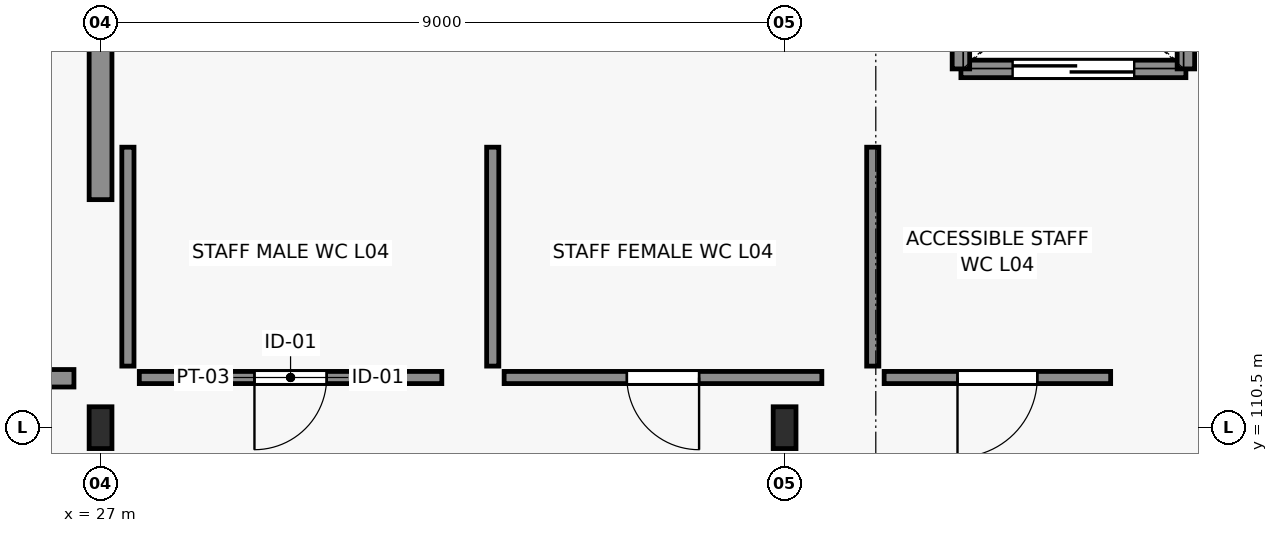
"""IFC4 building model, lengths in metres.
Left out: names, types, materials, properties, quantities, classifications, styles, units other than length and angle.
Written with IfcOpenShell. Run it as: python <this file> out.ifc"""

import sys

from ifc_helpers import new_model, si_unit, direction, frame, frame_2d, origin, origin_2d, place, context, subcontext, project, spatial, rectangle, i_section, extrude, element, fill, save


model = new_model("IFC4")
c1 = context("Model", 3, precision=1e-05, world=origin(), true_north=direction((0.0, 1.0)))
c2 = subcontext(c1, "Body", "Model", "MODEL_VIEW")
j1 = project(units=[si_unit("LENGTHUNIT", "METRE"), si_unit("PLANEANGLEUNIT", "RADIAN")], contexts=[c1])
p1 = place(None, origin())
s1 = spatial("IfcSite", under=j1, at=p1, CompositionType="ELEMENT")
p2 = place(p1, origin())
s2 = spatial("IfcBuilding", under=s1, at=p2, CompositionType="ELEMENT")
p3 = place(p2, frame((0.0, 0.0, 19.5)))
s3 = spatial("IfcBuildingStorey", under=s2, at=p3, CompositionType="ELEMENT", Elevation=19.5)
for number, where, z_axis, x_axis in (
    (1, (27.0, 110.5, 0.0), (0.0, 0.0, 1.0), (1.0, 0.0, 0.0)),
    (2, (36.0, 110.5, 0.0), (0.0, 0.0, 1.0), (1.0, 0.0, 0.0)),
):
    element("IfcColumn", number, at=place(p3, frame(where, z_axis=z_axis, x_axis=x_axis)), inside=s3, PredefinedType="COLUMN", context=c2, shape_type="SweptSolid", body=[
        extrude(i_section(OverallWidth=0.3, OverallDepth=0.55, WebThickness=0.015, FlangeThickness=0.029, FilletRadius=0.027, at=origin_2d()), origin(), (0.0, 0.0, 1.0), 4.275),
    ])
p4 = place(p3, frame((27.0, 113.5, 0.0), z_axis=(0.0, 0.0, 1.0), x_axis=(0.0, 1.0, 0.0)))
e3 = element("IfcWall", 3, at=p4, inside=s3, PredefinedType="SHEAR", context=c2, shape_type="SweptSolid", body=[
    extrude(rectangle(XDim=4.825, YDim=0.3, at=frame_2d((2.413, 0.0))), origin(), (0.0, 0.0, 1.0), 4.275),
])
p5 = place(p3, frame((31.49, 111.16, 0.0), z_axis=(0.0, 0.0, 1.0), x_axis=(-1.0, 0.0, 0.0)))
e4 = element("IfcWall", 4, at=p5, inside=s3, PredefinedType="PARTITIONING", context=c2, shape_type="SweptSolid", body=[
    extrude(rectangle(XDim=3.98, YDim=0.16, at=frame_2d((1.99, 0.0))), origin(), (0.0, 0.0, 1.0), 4.025),
])
p6 = place(p5, frame((1.515, 0.0, 0.0)))
e5 = element("IfcOpeningElement", 5, at=p6, cuts=e4, PredefinedType="OPENING", context=c2, shape_type="SweptSolid", body=[
    extrude(rectangle(XDim=0.95, YDim=2.15, at=frame_2d((0.475, 1.075))), frame((0.0, 0.09, 0.0), z_axis=(0.0, -1.0, 0.0), x_axis=(1.0, 0.0, 0.0)), (0.0, 0.0, 1.0), 0.18),
])
p7 = place(p3, frame((27.36, 111.31, 0.0), z_axis=(0.0, 0.0, 1.0), x_axis=(0.0, 1.0, 0.0)))
e6 = element("IfcWall", 6, at=p7, inside=s3, PredefinedType="PARTITIONING", context=c2, shape_type="SweptSolid", body=[
    extrude(rectangle(XDim=2.88, YDim=0.16, at=frame_2d((1.44, 0.0))), origin(), (0.0, 0.0, 1.0), 4.25),
])
p8 = place(p3, frame((36.49, 111.16, 0.0), z_axis=(0.0, 0.0, 1.0), x_axis=(-1.0, 0.0, 0.0)))
e7 = element("IfcWall", 7, at=p8, inside=s3, PredefinedType="PARTITIONING", context=c2, shape_type="SweptSolid", body=[
    extrude(rectangle(XDim=4.18, YDim=0.16, at=frame_2d((2.09, 0.0))), origin(), (0.0, 0.0, 1.0), 3.695),
])
p9 = place(p8, frame((1.615, 0.0, 0.0)))
e8 = element("IfcOpeningElement", 8, at=p9, cuts=e7, PredefinedType="OPENING", context=c2, shape_type="SweptSolid", body=[
    extrude(rectangle(XDim=0.95, YDim=2.15, at=frame_2d((0.475, 1.075))), frame((0.0, 0.09, 0.0), z_axis=(0.0, -1.0, 0.0), x_axis=(1.0, 0.0, 0.0)), (0.0, 0.0, 1.0), 0.18),
])
p10 = place(p3, frame((32.16, 111.31, 0.0), z_axis=(0.0, 0.0, 1.0), x_axis=(0.0, 1.0, 0.0)))
e9 = element("IfcWall", 9, at=p10, inside=s3, PredefinedType="PARTITIONING", context=c2, shape_type="SweptSolid", body=[
    extrude(rectangle(XDim=2.88, YDim=0.16, at=frame_2d((1.44, 0.0))), origin(), (0.0, 0.0, 1.0), 4.25),
])
p11 = place(p3, frame((40.29, 111.16, 0.0), z_axis=(0.0, 0.0, 1.0), x_axis=(-1.0, 0.0, 0.0)))
e10 = element("IfcWall", 10, at=p11, inside=s3, PredefinedType="PARTITIONING", context=c2, shape_type="SweptSolid", body=[
    extrude(rectangle(XDim=2.98, YDim=0.16, at=frame_2d((1.49, 0.0))), origin(), (0.0, 0.0, 1.0), 4.025),
])
p12 = place(p11, frame((0.965, 0.0, 0.0)))
e11 = element("IfcOpeningElement", 11, at=p12, cuts=e10, PredefinedType="OPENING", context=c2, shape_type="SweptSolid", body=[
    extrude(rectangle(XDim=1.05, YDim=2.2, at=frame_2d((0.525, 1.1))), frame((0.0, 0.09, 0.0), z_axis=(0.0, -1.0, 0.0), x_axis=(1.0, 0.0, 0.0)), (0.0, 0.0, 1.0), 0.18),
])
p13 = place(p3, frame((37.16, 111.31, 0.0), z_axis=(0.0, 0.0, 1.0), x_axis=(0.0, 1.0, 0.0)))
e12 = element("IfcWall", 12, at=p13, inside=s3, PredefinedType="PARTITIONING", context=c2, shape_type="SweptSolid", body=[
    extrude(rectangle(XDim=2.88, YDim=0.16, at=frame_2d((1.44, 0.0))), origin(), (0.0, 0.0, 1.0), 4.25),
])
p14 = place(p3, frame((41.28, 115.22, 0.0), z_axis=(0.0, 0.0, 1.0), x_axis=(-1.0, 0.0, 0.0)))
e13 = element("IfcWall", 13, at=p14, inside=s3, PredefinedType="SOLIDWALL", context=c2, shape_type="SweptSolid", body=[
    extrude(rectangle(XDim=2.96, YDim=0.23, at=frame_2d((1.48, 0.0))), origin(), (0.0, 0.0, 1.0), 4.025),
])
p15 = place(p14, frame((0.68, 0.0, 0.0)))
e14 = element("IfcOpeningElement", 14, at=p15, cuts=e13, PredefinedType="OPENING", context=c2, shape_type="SweptSolid", body=[
    extrude(rectangle(XDim=1.6, YDim=2.3, at=frame_2d((0.8, 1.15))), frame((0.0, 0.125, 0.0), z_axis=(0.0, -1.0, 0.0), x_axis=(1.0, 0.0, 0.0)), (0.0, 0.0, 1.0), 0.25),
])
for number, where, z_axis, x_axis in (
    (15, (38.32, 115.22, 0.0), (0.0, 0.0, 1.0), (0.0, 1.0, 0.0)),
    (16, (41.28, 117.78, 0.0), (0.0, 0.0, 1.0), (0.0, -1.0, 0.0)),
):
    element("IfcWall", number, at=place(p3, frame(where, z_axis=z_axis, x_axis=x_axis)), inside=s3, PredefinedType="SOLIDWALL", context=c2, shape_type="SweptSolid", body=[
        extrude(rectangle(XDim=2.56, YDim=0.23, at=frame_2d((1.28, 0.0))), origin(), (0.0, 0.0, 1.0), 4.26),
    ])
p16 = place(p3, frame((15.3, 111.15, 0.0), z_axis=(0.0, 0.0, 1.0), x_axis=(1.0, 0.0, 0.0)))
e17 = element("IfcWall", 17, at=p16, inside=s3, PredefinedType="SOLIDWALL", context=c2, shape_type="SweptSolid", body=[
    extrude(rectangle(XDim=11.35, YDim=0.23, at=frame_2d((5.675, 0.0))), origin(), (0.0, 0.0, 1.0), 3.695),
])
p17 = place(p16, frame((0.55, 0.0, 0.0)))
e18 = element("IfcOpeningElement", 18, at=p17, cuts=e17, PredefinedType="OPENING", context=c2, shape_type="SweptSolid", body=[
    extrude(rectangle(XDim=1.8, YDim=2.3, at=frame_2d((0.9, 1.15))), frame((0.0, 0.125, 0.0), z_axis=(0.0, -1.0, 0.0), x_axis=(1.0, 0.0, 0.0)), (0.0, 0.0, 1.0), 0.25),
])
p18 = place(p6, origin())
e19 = element("IfcDoor", 19, at=p18, inside=s3, OperationType="SINGLE_SWING_RIGHT", PredefinedType="DOOR", context=c2, shape_type="SweptSolid", body=[
    extrude(rectangle(XDim=0.95, YDim=2.15, at=frame_2d((0.475, 1.075))), frame((0.0, 0.025, 0.0), z_axis=(0.0, -1.0, 0.0), x_axis=(1.0, 0.0, 0.0)), (0.0, 0.0, 1.0), 0.05),
])
fill(e5, e19)
p19 = place(p9, origin())
e20 = element("IfcDoor", 20, at=p19, inside=s3, OperationType="SINGLE_SWING_LEFT", PredefinedType="DOOR", context=c2, shape_type="SweptSolid", body=[
    extrude(rectangle(XDim=0.95, YDim=2.15, at=frame_2d((0.475, 1.075))), frame((0.0, 0.025, 0.0), z_axis=(0.0, -1.0, 0.0), x_axis=(1.0, 0.0, 0.0)), (0.0, 0.0, 1.0), 0.05),
])
fill(e8, e20)
p20 = place(p12, origin())
e21 = element("IfcDoor", 21, at=p20, inside=s3, OperationType="SINGLE_SWING_RIGHT", PredefinedType="DOOR", context=c2, shape_type="SweptSolid", body=[
    extrude(rectangle(XDim=1.05, YDim=2.2, at=frame_2d((0.525, 1.1))), frame((0.0, 0.025, 0.0), z_axis=(0.0, -1.0, 0.0), x_axis=(1.0, 0.0, 0.0)), (0.0, 0.0, 1.0), 0.05),
])
fill(e11, e21)
p21 = place(p15, origin())
e22 = element("IfcDoor", 22, at=p21, inside=s3, OperationType="DOUBLE_DOOR_SLIDING", PredefinedType="DOOR", context=c2, shape_type="SweptSolid", body=[
    extrude(rectangle(XDim=1.6, YDim=2.3, at=frame_2d((0.8, 1.15))), frame((0.0, 0.025, 0.0), z_axis=(0.0, -1.0, 0.0), x_axis=(1.0, 0.0, 0.0)), (0.0, 0.0, 1.0), 0.05),
])
fill(e14, e22)
save(model, sys.argv[1])
